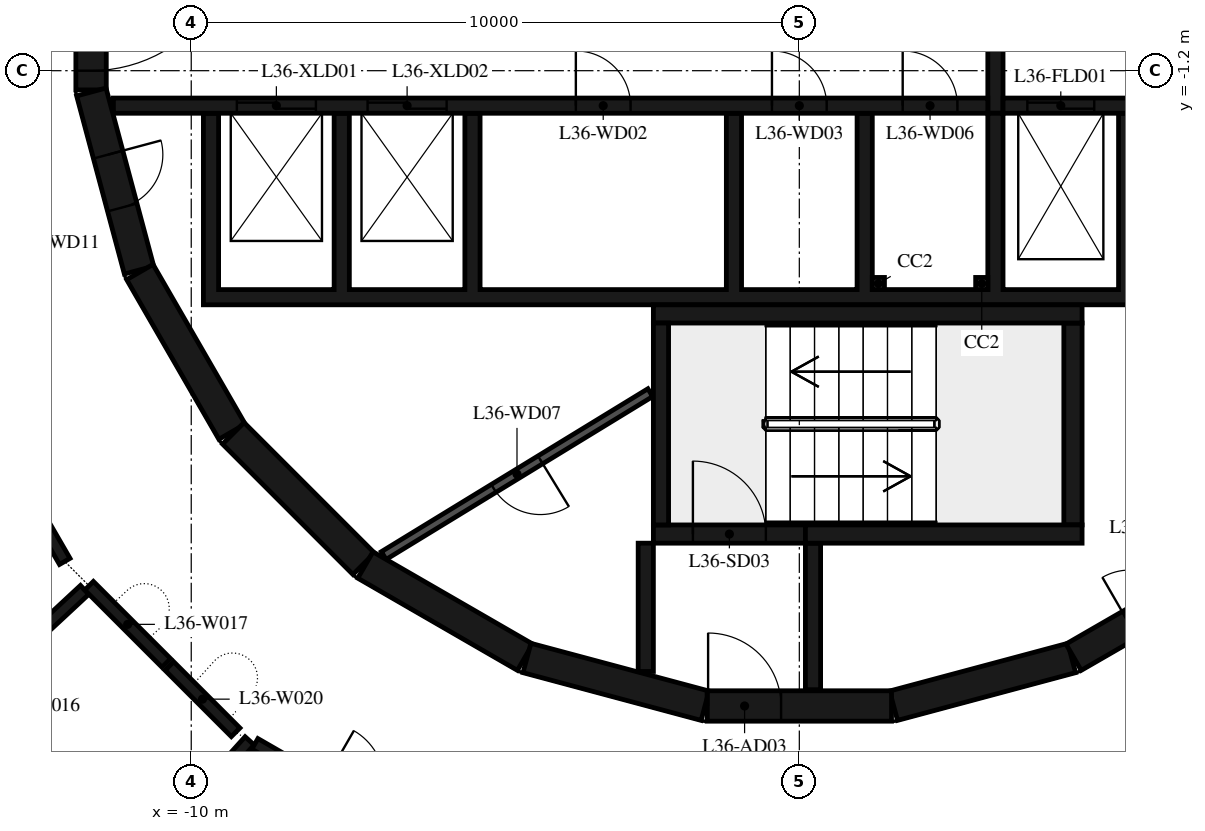
"""IFC4 building model, lengths in metres.
Left out: names, types, materials, properties, quantities, classifications, styles, units other than length and angle.
Written with IfcOpenShell. Run it as: python <this file> out.ifc"""

import sys

from ifc_helpers import new_model, si_unit, direction, frame, frame_2d, origin, origin_2d, place, context, subcontext, project, spatial, polyline, rectangle, outline, extrude, element, fill, save


model = new_model("IFC4")
c1 = context("Model", 3, precision=1e-05, world=origin(), true_north=direction((0.0, 1.0)))
c2 = subcontext(c1, "Body", "Model", "MODEL_VIEW")
j1 = project(units=[si_unit("LENGTHUNIT", "METRE"), si_unit("PLANEANGLEUNIT", "RADIAN")], contexts=[c1])
p1 = place(None, origin())
s1 = spatial("IfcSite", under=j1, at=p1, CompositionType="ELEMENT")
p2 = place(p1, origin())
s2 = spatial("IfcBuilding", under=s1, at=p2, CompositionType="ELEMENT")
p3 = place(p2, frame((0.0, 0.0, 144.9)))
s3 = spatial("IfcBuildingStorey", under=s2, at=p3, CompositionType="ELEMENT", Elevation=144.9)
for number, where, z_axis, x_axis in (
    (1, (1.3, -4.7, 0.0), (0.0, 0.0, 1.0), (1.0, 0.0, 0.0)),
    (2, (3.0, -4.7, 0.0), (0.0, 0.0, 1.0), (1.0, 0.0, 0.0)),
):
    element("IfcColumn", number, at=place(p3, frame(where, z_axis=z_axis, x_axis=x_axis)), inside=s3, PredefinedType="COLUMN", context=c2, shape_type="SweptSolid", body=[
        extrude(rectangle(XDim=0.2, YDim=0.2, at=origin_2d()), origin(), (0.0, 0.0, 1.0), 4.75),
    ])
p4 = place(p3, frame((1.55, -11.643, 0.0), z_axis=(0.0, 0.0, 1.0), x_axis=(0.965948410781, 0.258734743916, 0.0)))
e3 = element("IfcWall", 3, at=p4, inside=s3, PredefinedType="SHEAR", context=c2, shape_type="SweptSolid", body=[
    extrude(rectangle(XDim=3.033, YDim=0.5, at=frame_2d((1.516, 0.0))), origin(), (0.0, 0.0, 1.0), 6.35),
])
p5 = place(p3, frame((4.51, -10.845, 0.0), z_axis=(0.0, 0.0, 1.0), x_axis=(0.865975092491, 0.500087131594, 0.0)))
e4 = element("IfcWall", 4, at=p5, inside=s3, PredefinedType="SHEAR", context=c2, shape_type="SweptSolid", body=[
    extrude(rectangle(XDim=3.033, YDim=0.5, at=frame_2d((1.516, 0.0))), origin(), (0.0, 0.0, 1.0), 6.35),
])
p6 = place(p5, frame((1.066, 0.0, 0.0)))
e5 = element("IfcOpeningElement", 5, at=p6, cuts=e4, PredefinedType="OPENING", context=c2, shape_type="SweptSolid", body=[
    extrude(rectangle(XDim=0.9, YDim=2.1, at=frame_2d((0.45, 1.05))), frame((0.0, 0.26, 0.0), z_axis=(0.0, -1.0, 0.0), x_axis=(1.0, 0.0, 0.0)), (0.0, 0.0, 1.0), 0.52),
])
p7 = place(p3, frame((-11.647, 1.516, 0.0), z_axis=(0.0, 0.0, 1.0), x_axis=(0.0, -1.0, 0.0)))
e6 = element("IfcWall", 6, at=p7, inside=s3, PredefinedType="SHEAR", context=c2, shape_type="SweptSolid", body=[
    extrude(rectangle(XDim=3.033, YDim=0.5, at=frame_2d((1.516, 0.0))), origin(), (0.0, 0.0, 1.0), 6.35),
])
p8 = place(p7, frame((0.316, 0.0, 0.0)))
e7 = element("IfcOpeningElement", 7, at=p8, cuts=e6, PredefinedType="OPENING", context=c2, shape_type="SweptSolid", body=[
    extrude(rectangle(XDim=2.4, YDim=2.1, at=frame_2d((1.2, 1.05))), frame((0.0, 0.26, 0.0), z_axis=(0.0, -1.0, 0.0), x_axis=(1.0, 0.0, 0.0)), (0.0, 0.0, 1.0), 0.52),
])
p9 = place(p3, frame((-11.643, -1.55, 0.0), z_axis=(0.0, 0.0, 1.0), x_axis=(0.258734743916, -0.965948410781, 0.0)))
e8 = element("IfcWall", 8, at=p9, inside=s3, PredefinedType="SHEAR", context=c2, shape_type="SweptSolid", body=[
    extrude(rectangle(XDim=3.033, YDim=0.5, at=frame_2d((1.516, 0.0))), origin(), (0.0, 0.0, 1.0), 6.35),
])
p10 = place(p9, frame((1.066, 0.0, 0.0)))
e9 = element("IfcOpeningElement", 9, at=p10, cuts=e8, PredefinedType="OPENING", context=c2, shape_type="SweptSolid", body=[
    extrude(rectangle(XDim=0.9, YDim=2.1, at=frame_2d((0.45, 1.05))), frame((0.0, 0.26, 0.0), z_axis=(0.0, -1.0, 0.0), x_axis=(1.0, 0.0, 0.0)), (0.0, 0.0, 1.0), 0.52),
])
p11 = place(p3, frame((-10.845, -4.51, 0.0), z_axis=(0.0, 0.0, 1.0), x_axis=(0.500087131594, -0.865975092491, 0.0)))
e10 = element("IfcWall", 10, at=p11, inside=s3, PredefinedType="SHEAR", context=c2, shape_type="SweptSolid", body=[
    extrude(rectangle(XDim=3.033, YDim=0.5, at=frame_2d((1.516, 0.0))), origin(), (0.0, 0.0, 1.0), 6.35),
])
p12 = place(p3, frame((-9.308, -7.164, 0.0), z_axis=(0.0, 0.0, 1.0), x_axis=(0.707106781187, -0.707106781187, 0.0)))
e11 = element("IfcWall", 11, at=p12, inside=s3, PredefinedType="SHEAR", context=c2, shape_type="SweptSolid", body=[
    extrude(rectangle(XDim=3.032, YDim=0.5, at=frame_2d((1.516, 0.0))), origin(), (0.0, 0.0, 1.0), 6.35),
])
for number, where, z_axis, x_axis in (
    (12, (-7.137, -9.329, 0.0), (0.0, 0.0, 1.0), (0.866, -0.5, 0.0)),
    (13, (-4.479, -10.858, 0.0), (0.0, 0.0, 1.0), (0.966, -0.259, 0.0)),
):
    element("IfcWall", number, at=place(p3, frame(where, z_axis=z_axis, x_axis=x_axis)), inside=s3, PredefinedType="SHEAR", context=c2, shape_type="SweptSolid", body=[
        extrude(rectangle(XDim=3.033, YDim=0.5, at=frame_2d((1.516, 0.0))), origin(), (0.0, 0.0, 1.0), 6.35),
    ])
p13 = place(p3, frame((-1.516, -11.647, 0.0), z_axis=(0.0, 0.0, 1.0), x_axis=(1.0, 0.0, 0.0)))
e14 = element("IfcWall", 14, at=p13, inside=s3, PredefinedType="SHEAR", context=c2, shape_type="SweptSolid", body=[
    extrude(rectangle(XDim=3.033, YDim=0.5, at=frame_2d((1.516, 0.0))), origin(), (0.0, 0.0, 1.0), 6.35),
])
p14 = place(p13, frame((0.016, 0.0, 0.0)))
e15 = element("IfcOpeningElement", 15, at=p14, cuts=e14, PredefinedType="OPENING", context=c2, shape_type="SweptSolid", body=[
    extrude(rectangle(XDim=1.2, YDim=2.1, at=frame_2d((0.6, 1.05))), frame((0.0, 0.26, 0.0), z_axis=(0.0, -1.0, 0.0), x_axis=(1.0, 0.0, 0.0)), (0.0, 0.0, 1.0), 0.52),
])
p15 = place(p3, frame((-2.275, -8.67, 0.0), z_axis=(0.0, 0.0, 1.0), x_axis=(0.0, 1.0, 0.0)))
e16 = element("IfcWall", 16, at=p15, inside=s3, PredefinedType="SHEAR", context=c2, shape_type="SweptSolid", body=[
    extrude(rectangle(XDim=3.32, YDim=0.25, at=frame_2d((1.66, 0.0))), origin(), (0.0, 0.0, 1.0), 6.35),
])
p16 = place(p3, frame((-2.4, -5.2, 0.0), z_axis=(0.0, 0.0, 1.0), x_axis=(1.0, 0.0, 0.0)))
e17 = element("IfcWall", 17, at=p16, inside=s3, PredefinedType="SHEAR", context=c2, shape_type="SweptSolid", body=[
    extrude(rectangle(XDim=7.05, YDim=0.3, at=frame_2d((3.525, 0.0))), origin(), (0.0, 0.0, 1.0), 6.35),
])
p17 = place(p3, frame((4.5, -8.67, 0.0), z_axis=(0.0, 0.0, 1.0), x_axis=(0.0, 1.0, 0.0)))
e18 = element("IfcWall", 18, at=p17, inside=s3, PredefinedType="SHEAR", context=c2, shape_type="SweptSolid", body=[
    extrude(rectangle(XDim=3.32, YDim=0.3, at=frame_2d((1.66, 0.0))), origin(), (0.0, 0.0, 1.0), 6.35),
])
p18 = place(p3, frame((0.1, -8.82, 0.0), z_axis=(0.0, 0.0, 1.0), x_axis=(1.0, 0.0, 0.0)))
e19 = element("IfcWall", 19, at=p18, inside=s3, PredefinedType="SHEAR", context=c2, shape_type="SweptSolid", body=[
    extrude(rectangle(XDim=4.55, YDim=0.3, at=frame_2d((2.275, 0.0))), origin(), (0.0, 0.0, 1.0), 6.35),
])
p19 = place(p3, frame((-2.4, -8.82, 0.0), z_axis=(0.0, 0.0, 1.0), x_axis=(1.0, 0.0, 0.0)))
e20 = element("IfcWall", 20, at=p19, inside=s3, PredefinedType="SHEAR", context=c2, shape_type="SweptSolid", body=[
    extrude(rectangle(XDim=2.5, YDim=0.3, at=frame_2d((1.25, 0.0))), origin(), (0.0, 0.0, 1.0), 6.35),
])
p20 = place(p19, frame((0.65, 0.0, 0.0)))
e21 = element("IfcOpeningElement", 21, at=p20, cuts=e20, PredefinedType="OPENING", context=c2, shape_type="SweptSolid", body=[
    extrude(rectangle(XDim=1.2, YDim=2.1, at=frame_2d((0.6, 1.05))), frame((0.0, 0.16, 0.0), z_axis=(0.0, -1.0, 0.0), x_axis=(1.0, 0.0, 0.0)), (0.0, 0.0, 1.0), 0.32),
])
p21 = place(p3, frame((-2.525, -8.97, 0.0), z_axis=(0.0, 0.0, 1.0), x_axis=(0.0, -1.0, 0.0)))
e22 = element("IfcWall", 22, at=p21, inside=s3, PredefinedType="SHEAR", context=c2, shape_type="SweptSolid", body=[
    extrude(rectangle(XDim=2.11, YDim=0.25, at=frame_2d((1.055, 0.0))), origin(), (0.0, 0.0, 1.0), 6.35),
])
p22 = place(p3, frame((0.225, -8.97, 0.0), z_axis=(0.0, 0.0, 1.0), x_axis=(0.0, -1.0, 0.0)))
e23 = element("IfcWall", 23, at=p22, inside=s3, PredefinedType="SHEAR", context=c2, shape_type="SweptSolid", body=[
    extrude(rectangle(XDim=2.41, YDim=0.25, at=frame_2d((1.205, 0.0))), origin(), (0.0, 0.0, 1.0), 6.35),
])
p23 = place(p3, origin())
e24 = element("IfcWall", 24, at=p23, inside=s3, PredefinedType="SHEAR", context=c2, shape_type="SweptSolid", body=[
    extrude(outline(polyline([(9.8, -5.05), (9.8, -4.8), (9.8, -1.9), (9.55, -1.9), (9.55, -4.8), (7.65, -4.8), (7.65, -1.9), (7.4, -1.9), (7.4, -4.8), (5.5, -4.8), (5.5, -1.9), (5.25, -1.9), (5.25, -4.8), (3.35, -4.8), (3.35, -1.9), (3.1, -1.9), (3.1, -4.8), (1.2, -4.8), (1.2, -1.9), (0.95, -1.9), (0.95, -4.8), (-0.95, -4.8), (-0.95, -1.9), (-1.2, -1.9), (-1.2, -4.8), (-5.25, -4.8), (-5.25, -1.9), (-5.5, -1.9), (-5.5, -4.8), (-7.4, -4.8), (-7.4, -1.9), (-7.65, -1.9), (-7.65, -4.8), (-9.55, -4.8), (-9.55, -1.9), (-9.8, -1.9), (-9.8, -4.8), (-9.8, -5.05), (9.8, -5.05)])), origin(), (0.0, 0.0, 1.0), 6.35),
])
p24 = place(p3, frame((-11.28, -1.775, 0.0), z_axis=(0.0, 0.0, 1.0), x_axis=(1.0, 0.0, 0.0)))
e25 = element("IfcWall", 25, at=p24, inside=s3, PredefinedType="SHEAR", context=c2, shape_type="SweptSolid", body=[
    extrude(rectangle(XDim=14.38, YDim=0.25, at=frame_2d((7.19, 0.0))), origin(), (0.0, 0.0, 1.0), 6.35),
])
p25 = place(p24, frame((2.03, 0.0, 0.0)))
e26 = element("IfcOpeningElement", 26, at=p25, cuts=e25, PredefinedType="OPENING", context=c2, shape_type="SweptSolid", body=[
    extrude(rectangle(XDim=1.3, YDim=2.1, at=frame_2d((0.65, 1.05))), frame((0.0, 0.135, 0.0), z_axis=(0.0, -1.0, 0.0), x_axis=(1.0, 0.0, 0.0)), (0.0, 0.0, 1.0), 0.27),
])
p26 = place(p24, frame((4.18, 0.0, 0.0)))
e27 = element("IfcOpeningElement", 27, at=p26, cuts=e25, PredefinedType="OPENING", context=c2, shape_type="SweptSolid", body=[
    extrude(rectangle(XDim=1.3, YDim=2.1, at=frame_2d((0.65, 1.05))), frame((0.0, 0.135, 0.0), z_axis=(0.0, -1.0, 0.0), x_axis=(1.0, 0.0, 0.0)), (0.0, 0.0, 1.0), 0.27),
])
p27 = place(p24, frame((7.605, 0.0, 0.0)))
e28 = element("IfcOpeningElement", 28, at=p27, cuts=e25, PredefinedType="OPENING", context=c2, shape_type="SweptSolid", body=[
    extrude(rectangle(XDim=0.9, YDim=2.1, at=frame_2d((0.45, 1.05))), frame((0.0, 0.135, 0.0), z_axis=(0.0, -1.0, 0.0), x_axis=(1.0, 0.0, 0.0)), (0.0, 0.0, 1.0), 0.27),
])
p28 = place(p24, frame((10.83, 0.0, 0.0)))
e29 = element("IfcOpeningElement", 29, at=p28, cuts=e25, PredefinedType="OPENING", context=c2, shape_type="SweptSolid", body=[
    extrude(rectangle(XDim=0.9, YDim=2.1, at=frame_2d((0.45, 1.05))), frame((0.0, 0.135, 0.0), z_axis=(0.0, -1.0, 0.0), x_axis=(1.0, 0.0, 0.0)), (0.0, 0.0, 1.0), 0.27),
])
p29 = place(p24, frame((12.98, 0.0, 0.0)))
e30 = element("IfcOpeningElement", 30, at=p29, cuts=e25, PredefinedType="OPENING", context=c2, shape_type="SweptSolid", body=[
    extrude(rectangle(XDim=0.9, YDim=2.1, at=frame_2d((0.45, 1.05))), frame((0.0, 0.135, 0.0), z_axis=(0.0, -1.0, 0.0), x_axis=(1.0, 0.0, 0.0)), (0.0, 0.0, 1.0), 0.27),
])
p30 = place(p3, frame((3.35, -1.775, 0.0), z_axis=(0.0, 0.0, 1.0), x_axis=(1.0, 0.0, 0.0)))
e31 = element("IfcWall", 31, at=p30, inside=s3, PredefinedType="SHEAR", context=c2, shape_type="SweptSolid", body=[
    extrude(rectangle(XDim=7.93, YDim=0.25, at=frame_2d((3.965, 0.0))), origin(), (0.0, 0.0, 1.0), 6.35),
])
p31 = place(p30, frame((0.4, 0.0, 0.0)))
e32 = element("IfcOpeningElement", 32, at=p31, cuts=e31, PredefinedType="OPENING", context=c2, shape_type="SweptSolid", body=[
    extrude(rectangle(XDim=1.1, YDim=2.4, at=frame_2d((0.55, 1.2))), frame((0.0, 0.135, 0.0), z_axis=(0.0, -1.0, 0.0), x_axis=(1.0, 0.0, 0.0)), (0.0, 0.0, 1.0), 0.27),
])
p32 = place(p30, frame((2.55, 0.0, 0.0)))
e33 = element("IfcOpeningElement", 33, at=p32, cuts=e31, PredefinedType="OPENING", context=c2, shape_type="SweptSolid", body=[
    extrude(rectangle(XDim=1.1, YDim=2.4, at=frame_2d((0.55, 1.2))), frame((0.0, 0.135, 0.0), z_axis=(0.0, -1.0, 0.0), x_axis=(1.0, 0.0, 0.0)), (0.0, 0.0, 1.0), 0.27),
])
p33 = place(p30, frame((4.7, 0.0, 0.0)))
e34 = element("IfcOpeningElement", 34, at=p33, cuts=e31, PredefinedType="OPENING", context=c2, shape_type="SweptSolid", body=[
    extrude(rectangle(XDim=1.1, YDim=2.4, at=frame_2d((0.55, 1.2))), frame((0.0, 0.135, 0.0), z_axis=(0.0, -1.0, 0.0), x_axis=(1.0, 0.0, 0.0)), (0.0, 0.0, 1.0), 0.27),
])
p34 = place(p3, frame((3.225, -1.9, 0.0), z_axis=(0.0, 0.0, 1.0), x_axis=(0.0, 1.0, 0.0)))
e35 = element("IfcWall", 35, at=p34, inside=s3, PredefinedType="SHEAR", context=c2, shape_type="SweptSolid", body=[
    extrude(rectangle(XDim=3.8, YDim=0.25, at=frame_2d((1.9, 0.0))), origin(), (0.0, 0.0, 1.0), 6.35),
])
p35 = place(p3, frame((-2.451, -6.495, 0.0), z_axis=(0.0, 0.0, 1.0), x_axis=(-0.853250115418, -0.521501908471, 0.0)))
e36 = element("IfcWall", 36, at=p35, inside=s3, PredefinedType="PARTITIONING", context=c2, shape_type="SweptSolid", body=[
    extrude(rectangle(XDim=5.137, YDim=0.15, at=frame_2d((2.569, 0.0))), origin(), (0.0, 0.0, 1.0), 6.35),
])
p36 = place(p35, frame((2.119, 0.0, 0.0)))
e37 = element("IfcOpeningElement", 37, at=p36, cuts=e36, PredefinedType="OPENING", context=c2, shape_type="SweptSolid", body=[
    extrude(rectangle(XDim=0.9, YDim=2.1, at=frame_2d((0.45, 1.05))), frame((0.0, 0.085, 0.0), z_axis=(0.0, -1.0, 0.0), x_axis=(1.0, 0.0, 0.0)), (0.0, 0.0, 1.0), 0.17),
])
p37 = place(p3, frame((-14.02, -5.917, 0.0), z_axis=(0.0, 0.0, 1.0), x_axis=(0.500733182901, -0.865601686425, 0.0)))
e38 = element("IfcWall", 38, at=p37, inside=s3, PredefinedType="PARTITIONING", context=c2, shape_type="SweptSolid", body=[
    extrude(rectangle(XDim=3.874, YDim=0.2, at=frame_2d((1.937, 0.0))), origin(), (0.0, 0.0, 1.0), 6.35),
])
p38 = place(p37, frame((1.437, 0.0, 0.0)))
e39 = element("IfcOpeningElement", 39, at=p38, cuts=e38, PredefinedType="OPENING", context=c2, shape_type="SweptSolid", body=[
    extrude(rectangle(XDim=1.0, YDim=2.1, at=frame_2d((0.5, 1.05))), frame((0.0, 0.11, 0.0), z_axis=(0.0, -1.0, 0.0), x_axis=(1.0, 0.0, 0.0)), (0.0, 0.0, 1.0), 0.22),
])
p39 = place(p3, frame((-12.873, -16.466, 0.0), z_axis=(0.0, 0.0, 1.0), x_axis=(0.670098193638, 0.742272464048, 0.0)))
e40 = element("IfcWall", 40, at=p39, inside=s3, PredefinedType="PARTITIONING", context=c2, shape_type="SweptSolid", body=[
    extrude(rectangle(XDim=5.72, YDim=0.2, at=frame_2d((2.86, 0.0))), origin(), (0.0, 0.0, 1.0), 6.35),
])
p40 = place(p3, frame((-11.753, -9.738, 0.0), z_axis=(0.0, 0.0, 1.0), x_axis=(-0.732435443259, -0.680836486579, 0.0)))
e41 = element("IfcWall", 41, at=p40, inside=s3, PredefinedType="PARTITIONING", context=c2, shape_type="SweptSolid", body=[
    extrude(rectangle(XDim=5.612, YDim=0.2, at=frame_2d((2.806, 0.0))), origin(), (0.0, 0.0, 1.0), 6.35),
])
p41 = place(p3, frame((-11.68, -9.67, 0.0), z_axis=(0.0, 0.0, 1.0), x_axis=(0.707106781187, -0.707106781187, 0.0)))
e42 = element("IfcWall", 42, at=p41, inside=s3, PredefinedType="PARTITIONING", context=c2, shape_type="SweptSolid", body=[
    extrude(rectangle(XDim=1.796, YDim=0.2, at=frame_2d((0.898, 0.0))), origin(), (0.0, 0.0, 1.0), 6.35),
])
p42 = place(p3, frame((-10.36, -10.99, 0.0), z_axis=(0.0, 0.0, 1.0), x_axis=(0.707106781187, -0.707106781187, 0.0)))
e43 = element("IfcWall", 43, at=p42, inside=s3, PredefinedType="PARTITIONING", context=c2, shape_type="SweptSolid", body=[
    extrude(rectangle(XDim=1.542, YDim=0.2, at=frame_2d((0.771, 0.0))), origin(), (0.0, 0.0, 1.0), 6.35),
])
p43 = place(p3, frame((-8.953, -12.27, 0.0), z_axis=(0.0, 0.0, 1.0), x_axis=(0.866407617873, -0.499337400655, 0.0)))
e44 = element("IfcWall", 44, at=p43, inside=s3, PredefinedType="PARTITIONING", context=c2, shape_type="SweptSolid", body=[
    extrude(rectangle(XDim=3.605, YDim=0.2, at=frame_2d((1.802, 0.0))), origin(), (0.0, 0.0, 1.0), 6.35),
])
p44 = place(p43, frame((1.302, 0.0, 0.0)))
e45 = element("IfcOpeningElement", 45, at=p44, cuts=e44, PredefinedType="OPENING", context=c2, shape_type="SweptSolid", body=[
    extrude(rectangle(XDim=1.0, YDim=2.1, at=frame_2d((0.5, 1.05))), frame((0.0, 0.11, 0.0), z_axis=(0.0, -1.0, 0.0), x_axis=(1.0, 0.0, 0.0)), (0.0, 0.0, 1.0), 0.22),
])
p45 = place(p20, origin())
e46 = element("IfcDoor", 46, at=p45, inside=s3, OperationType="SINGLE_SWING_LEFT", PredefinedType="DOOR", context=c2, shape_type="SweptSolid", body=[
    extrude(rectangle(XDim=1.2, YDim=2.1, at=frame_2d((0.6, 1.05))), frame((0.0, 0.025, 0.0), z_axis=(0.0, -1.0, 0.0), x_axis=(1.0, 0.0, 0.0)), (0.0, 0.0, 1.0), 0.05),
])
fill(e21, e46)
p46 = place(p14, origin())
e47 = element("IfcDoor", 47, at=p46, inside=s3, OperationType="SINGLE_SWING_RIGHT", PredefinedType="DOOR", context=c2, shape_type="SweptSolid", body=[
    extrude(rectangle(XDim=1.2, YDim=2.1, at=frame_2d((0.6, 1.05))), frame((0.0, 0.025, 0.0), z_axis=(0.0, -1.0, 0.0), x_axis=(1.0, 0.0, 0.0)), (0.0, 0.0, 1.0), 0.05),
])
fill(e15, e47)
p47 = place(p8, origin())
e48 = element("IfcDoor", 48, at=p47, inside=s3, OperationType="DOUBLE_DOOR_SINGLE_SWING", PredefinedType="DOOR", context=c2, shape_type="SweptSolid", body=[
    extrude(rectangle(XDim=2.4, YDim=2.1, at=frame_2d((1.2, 1.05))), frame((0.0, 0.025, 0.0), z_axis=(0.0, -1.0, 0.0), x_axis=(1.0, 0.0, 0.0)), (0.0, 0.0, 1.0), 0.05),
])
fill(e7, e48)
p48 = place(p25, origin())
e49 = element("IfcDoor", 49, at=p48, inside=s3, OperationType="DOUBLE_DOOR_SLIDING", PredefinedType="DOOR", context=c2, shape_type="SweptSolid", body=[
    extrude(rectangle(XDim=1.3, YDim=2.1, at=frame_2d((0.65, 1.05))), frame((0.0, 0.025, 0.0), z_axis=(0.0, -1.0, 0.0), x_axis=(1.0, 0.0, 0.0)), (0.0, 0.0, 1.0), 0.05),
])
fill(e26, e49)
p49 = place(p26, origin())
e50 = element("IfcDoor", 50, at=p49, inside=s3, OperationType="DOUBLE_DOOR_SLIDING", PredefinedType="DOOR", context=c2, shape_type="SweptSolid", body=[
    extrude(rectangle(XDim=1.3, YDim=2.1, at=frame_2d((0.65, 1.05))), frame((0.0, 0.025, 0.0), z_axis=(0.0, -1.0, 0.0), x_axis=(1.0, 0.0, 0.0)), (0.0, 0.0, 1.0), 0.05),
])
fill(e27, e50)
p50 = place(p31, origin())
e51 = element("IfcDoor", 51, at=p50, inside=s3, OperationType="DOUBLE_DOOR_SLIDING", PredefinedType="DOOR", context=c2, shape_type="SweptSolid", body=[
    extrude(rectangle(XDim=1.1, YDim=2.4, at=frame_2d((0.55, 1.2))), frame((0.0, 0.025, 0.0), z_axis=(0.0, -1.0, 0.0), x_axis=(1.0, 0.0, 0.0)), (0.0, 0.0, 1.0), 0.05),
])
fill(e32, e51)
p51 = place(p27, origin())
e52 = element("IfcDoor", 52, at=p51, inside=s3, OperationType="SINGLE_SWING_LEFT", PredefinedType="DOOR", context=c2, shape_type="SweptSolid", body=[
    extrude(rectangle(XDim=0.9, YDim=2.1, at=frame_2d((0.45, 1.05))), frame((0.0, 0.025, 0.0), z_axis=(0.0, -1.0, 0.0), x_axis=(1.0, 0.0, 0.0)), (0.0, 0.0, 1.0), 0.05),
])
fill(e28, e52)
p52 = place(p28, origin())
e53 = element("IfcDoor", 53, at=p52, inside=s3, OperationType="SINGLE_SWING_RIGHT", PredefinedType="DOOR", context=c2, shape_type="SweptSolid", body=[
    extrude(rectangle(XDim=0.9, YDim=2.1, at=frame_2d((0.45, 1.05))), frame((0.0, 0.025, 0.0), z_axis=(0.0, -1.0, 0.0), x_axis=(1.0, 0.0, 0.0)), (0.0, 0.0, 1.0), 0.05),
])
fill(e29, e53)
p53 = place(p29, origin())
e54 = element("IfcDoor", 54, at=p53, inside=s3, OperationType="SINGLE_SWING_LEFT", PredefinedType="DOOR", context=c2, shape_type="SweptSolid", body=[
    extrude(rectangle(XDim=0.9, YDim=2.1, at=frame_2d((0.45, 1.05))), frame((0.0, 0.025, 0.0), z_axis=(0.0, -1.0, 0.0), x_axis=(1.0, 0.0, 0.0)), (0.0, 0.0, 1.0), 0.05),
])
fill(e30, e54)
p54 = place(p36, origin())
e55 = element("IfcDoor", 55, at=p54, inside=s3, OperationType="SINGLE_SWING_RIGHT", PredefinedType="DOOR", context=c2, shape_type="SweptSolid", body=[
    extrude(rectangle(XDim=0.9, YDim=2.1, at=frame_2d((0.45, 1.05))), frame((0.0, 0.025, 0.0), z_axis=(0.0, -1.0, 0.0), x_axis=(1.0, 0.0, 0.0)), (0.0, 0.0, 1.0), 0.05),
])
fill(e37, e55)
p55 = place(p10, origin())
e56 = element("IfcDoor", 56, at=p55, inside=s3, OperationType="SINGLE_SWING_RIGHT", PredefinedType="DOOR", context=c2, shape_type="SweptSolid", body=[
    extrude(rectangle(XDim=0.9, YDim=2.1, at=frame_2d((0.45, 1.05))), frame((0.0, 0.025, 0.0), z_axis=(0.0, -1.0, 0.0), x_axis=(1.0, 0.0, 0.0)), (0.0, 0.0, 1.0), 0.05),
])
fill(e9, e56)
save(model, sys.argv[1])
